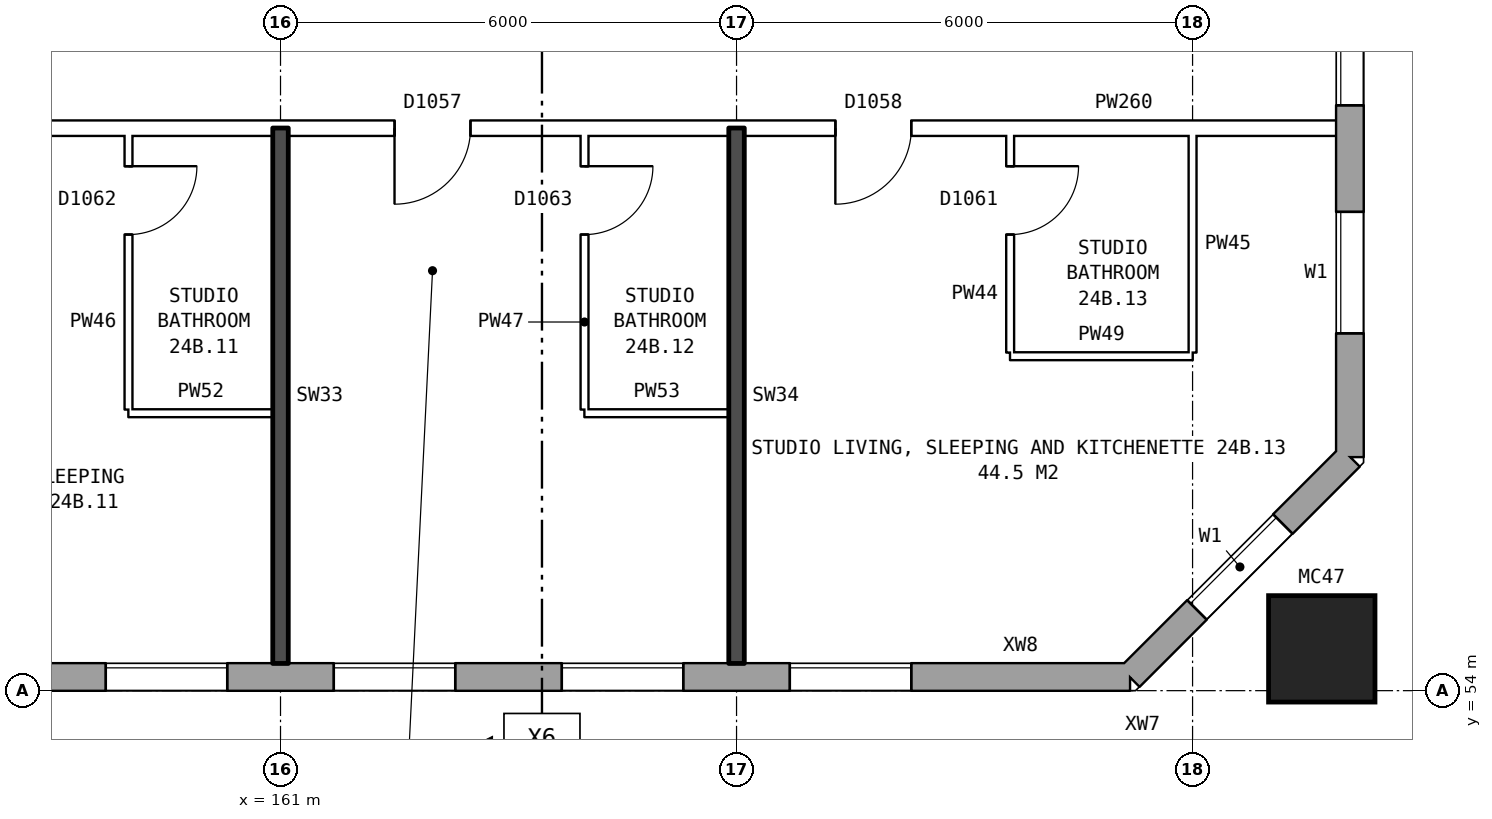
"""IFC4 building model, lengths in metres.
Left out: names, types, materials, properties, quantities, classifications, styles, units other than length and angle.
Written with IfcOpenShell. Run it as: python <this file> out.ifc"""

import sys

from ifc_helpers import new_model, si_unit, direction, frame, frame_2d, origin, origin_2d, place, context, subcontext, project, spatial, rectangle, hollow_rectangle, extrude, element, fill, save


model = new_model("IFC4")
c1 = context("Model", 3, precision=1e-05, world=origin(), true_north=direction((0.0, 1.0)))
c2 = subcontext(c1, "Body", "Model", "MODEL_VIEW")
j1 = project(units=[si_unit("LENGTHUNIT", "METRE"), si_unit("PLANEANGLEUNIT", "RADIAN")], contexts=[c1])
p1 = place(None, origin())
s1 = spatial("IfcSite", under=j1, at=p1, CompositionType="ELEMENT")
p2 = place(p1, origin())
s2 = spatial("IfcBuilding", under=s1, at=p2, CompositionType="ELEMENT")
p3 = place(p2, frame((0.0, 0.0, 87.1)))
s3 = spatial("IfcBuildingStorey", under=s2, at=p3, CompositionType="ELEMENT", Elevation=87.1)
p4 = place(p3, frame((174.7, 54.55, 0.0), z_axis=(0.0, 0.0, 1.0), x_axis=(1.0, 0.0, 0.0)))
e1 = element("IfcColumn", 1, at=p4, inside=s3, PredefinedType="COLUMN", context=c2, shape_type="SweptSolid", body=[
    extrude(hollow_rectangle(XDim=1.4, YDim=1.4, WallThickness=0.075, at=origin_2d()), origin(), (0.0, 0.0, 1.0), 3.1),
])
p5 = place(p3, frame((134.075, 54.18, 0.0), z_axis=(0.0, 0.0, 1.0), x_axis=(1.0, 0.0, 0.0)))
e2 = element("IfcWall", 2, at=p5, inside=s3, PredefinedType="STANDARD", context=c2, shape_type="SweptSolid", body=[
    extrude(rectangle(XDim=38.101, YDim=0.36, at=frame_2d((19.05, 0.0))), origin(), (0.0, 0.0, 1.0), 2.85),
])
p6 = place(p5, frame((0.625, 0.0, 0.8)))
e3 = element("IfcOpeningElement", 3, at=p6, cuts=e2, PredefinedType="OPENING", context=c2, shape_type="SweptSolid", body=[
    extrude(rectangle(XDim=1.6, YDim=1.8, at=frame_2d((0.8, 0.9))), frame((0.0, 0.19, 0.0), z_axis=(0.0, -1.0, 0.0), x_axis=(1.0, 0.0, 0.0)), (0.0, 0.0, 1.0), 0.38),
])
p7 = place(p5, frame((3.625, 0.0, 0.8)))
e4 = element("IfcOpeningElement", 4, at=p7, cuts=e2, PredefinedType="OPENING", context=c2, shape_type="SweptSolid", body=[
    extrude(rectangle(XDim=1.6, YDim=1.8, at=frame_2d((0.8, 0.9))), frame((0.0, 0.19, 0.0), z_axis=(0.0, -1.0, 0.0), x_axis=(1.0, 0.0, 0.0)), (0.0, 0.0, 1.0), 0.38),
])
p8 = place(p5, frame((6.625, 0.0, 0.8)))
e5 = element("IfcOpeningElement", 5, at=p8, cuts=e2, PredefinedType="OPENING", context=c2, shape_type="SweptSolid", body=[
    extrude(rectangle(XDim=1.6, YDim=1.8, at=frame_2d((0.8, 0.9))), frame((0.0, 0.19, 0.0), z_axis=(0.0, -1.0, 0.0), x_axis=(1.0, 0.0, 0.0)), (0.0, 0.0, 1.0), 0.38),
])
p9 = place(p5, frame((9.625, 0.0, 0.8)))
e6 = element("IfcOpeningElement", 6, at=p9, cuts=e2, PredefinedType="OPENING", context=c2, shape_type="SweptSolid", body=[
    extrude(rectangle(XDim=1.6, YDim=1.8, at=frame_2d((0.8, 0.9))), frame((0.0, 0.19, 0.0), z_axis=(0.0, -1.0, 0.0), x_axis=(1.0, 0.0, 0.0)), (0.0, 0.0, 1.0), 0.38),
])
p10 = place(p5, frame((12.625, 0.0, 0.8)))
e7 = element("IfcOpeningElement", 7, at=p10, cuts=e2, PredefinedType="OPENING", context=c2, shape_type="SweptSolid", body=[
    extrude(rectangle(XDim=1.6, YDim=1.8, at=frame_2d((0.8, 0.9))), frame((0.0, 0.19, 0.0), z_axis=(0.0, -1.0, 0.0), x_axis=(1.0, 0.0, 0.0)), (0.0, 0.0, 1.0), 0.38),
])
p11 = place(p5, frame((15.125, 0.0, 0.8)))
e8 = element("IfcOpeningElement", 8, at=p11, cuts=e2, PredefinedType="OPENING", context=c2, shape_type="SweptSolid", body=[
    extrude(rectangle(XDim=1.4, YDim=1.8, at=frame_2d((0.7, 0.9))), frame((0.0, 0.19, 0.0), z_axis=(0.0, -1.0, 0.0), x_axis=(1.0, 0.0, 0.0)), (0.0, 0.0, 1.0), 0.38),
])
p12 = place(p5, frame((18.325, 0.0, 0.15)))
e9 = element("IfcOpeningElement", 9, at=p12, cuts=e2, PredefinedType="OPENING", context=c2, shape_type="SweptSolid", body=[
    extrude(rectangle(XDim=1.4, YDim=1.2, at=frame_2d((0.7, 0.6))), frame((0.0, 0.19, 0.0), z_axis=(0.0, -1.0, 0.0), x_axis=(1.0, 0.0, 0.0)), (0.0, 0.0, 1.0), 0.38),
])
p13 = place(p5, frame((21.625, 0.0, 0.8)))
e10 = element("IfcOpeningElement", 10, at=p13, cuts=e2, PredefinedType="OPENING", context=c2, shape_type="SweptSolid", body=[
    extrude(rectangle(XDim=1.6, YDim=1.8, at=frame_2d((0.8, 0.9))), frame((0.0, 0.19, 0.0), z_axis=(0.0, -1.0, 0.0), x_axis=(1.0, 0.0, 0.0)), (0.0, 0.0, 1.0), 0.38),
])
p14 = place(p5, frame((24.625, 0.0, 0.8)))
e11 = element("IfcOpeningElement", 11, at=p14, cuts=e2, PredefinedType="OPENING", context=c2, shape_type="SweptSolid", body=[
    extrude(rectangle(XDim=1.6, YDim=1.8, at=frame_2d((0.8, 0.9))), frame((0.0, 0.19, 0.0), z_axis=(0.0, -1.0, 0.0), x_axis=(1.0, 0.0, 0.0)), (0.0, 0.0, 1.0), 0.38),
])
p15 = place(p5, frame((27.625, 0.0, 0.8)))
e12 = element("IfcOpeningElement", 12, at=p15, cuts=e2, PredefinedType="OPENING", context=c2, shape_type="SweptSolid", body=[
    extrude(rectangle(XDim=1.6, YDim=1.8, at=frame_2d((0.8, 0.9))), frame((0.0, 0.19, 0.0), z_axis=(0.0, -1.0, 0.0), x_axis=(1.0, 0.0, 0.0)), (0.0, 0.0, 1.0), 0.38),
])
p16 = place(p5, frame((30.625, 0.0, 0.8)))
e13 = element("IfcOpeningElement", 13, at=p16, cuts=e2, PredefinedType="OPENING", context=c2, shape_type="SweptSolid", body=[
    extrude(rectangle(XDim=1.6, YDim=1.8, at=frame_2d((0.8, 0.9))), frame((0.0, 0.19, 0.0), z_axis=(0.0, -1.0, 0.0), x_axis=(1.0, 0.0, 0.0)), (0.0, 0.0, 1.0), 0.38),
])
p17 = place(p5, frame((33.625, 0.0, 0.8)))
e14 = element("IfcOpeningElement", 14, at=p17, cuts=e2, PredefinedType="OPENING", context=c2, shape_type="SweptSolid", body=[
    extrude(rectangle(XDim=1.6, YDim=1.8, at=frame_2d((0.8, 0.9))), frame((0.0, 0.19, 0.0), z_axis=(0.0, -1.0, 0.0), x_axis=(1.0, 0.0, 0.0)), (0.0, 0.0, 1.0), 0.38),
])
p18 = place(p5, frame((16.825, 0.0, 1.7)))
e15 = element("IfcOpeningElement", 15, at=p18, cuts=e2, PredefinedType="OPENING", context=c2, shape_type="SweptSolid", body=[
    extrude(rectangle(XDim=0.6, YDim=0.9, at=frame_2d((0.3, 0.45))), frame((0.0, 0.19, 0.0), z_axis=(0.0, -1.0, 0.0), x_axis=(1.0, 0.0, 0.0)), (0.0, 0.0, 1.0), 0.38),
])
p19 = place(p3, frame((172.175, 54.18, 0.0), z_axis=(0.0, 0.0, 1.0), x_axis=(0.707106781187, 0.707106781187, 0.0)))
e16 = element("IfcWall", 16, at=p19, inside=s3, PredefinedType="STANDARD", context=c2, shape_type="SweptSolid", body=[
    extrude(rectangle(XDim=4.094, YDim=0.36, at=frame_2d((2.047, 0.0))), origin(), (0.0, 0.0, 1.0), 2.85),
])
p20 = place(p19, frame((1.247, 0.0, 0.8)))
e17 = element("IfcOpeningElement", 17, at=p20, cuts=e16, PredefinedType="OPENING", context=c2, shape_type="SweptSolid", body=[
    extrude(rectangle(XDim=1.6, YDim=1.8, at=frame_2d((0.8, 0.9))), frame((0.0, 0.19, 0.0), z_axis=(0.0, -1.0, 0.0), x_axis=(1.0, 0.0, 0.0)), (0.0, 0.0, 1.0), 0.38),
])
p21 = place(p3, frame((175.07, 57.075, 0.0), z_axis=(0.0, 0.0, 1.0), x_axis=(0.0, 1.0, 0.0)))
e18 = element("IfcWall", 18, at=p21, inside=s3, PredefinedType="STANDARD", context=c2, shape_type="SweptSolid", body=[
    extrude(rectangle(XDim=25.851, YDim=0.36, at=frame_2d((12.925, 0.0))), origin(), (0.0, 0.0, 1.0), 2.85),
])
p22 = place(p21, frame((1.625, 0.0, 0.8)))
e19 = element("IfcOpeningElement", 19, at=p22, cuts=e18, PredefinedType="OPENING", context=c2, shape_type="SweptSolid", body=[
    extrude(rectangle(XDim=1.6, YDim=1.8, at=frame_2d((0.8, 0.9))), frame((0.0, 0.19, 0.0), z_axis=(0.0, -1.0, 0.0), x_axis=(1.0, 0.0, 0.0)), (0.0, 0.0, 1.0), 0.38),
])
p23 = place(p21, frame((4.625, 0.0, 0.8)))
e20 = element("IfcOpeningElement", 20, at=p23, cuts=e18, PredefinedType="OPENING", context=c2, shape_type="SweptSolid", body=[
    extrude(rectangle(XDim=1.6, YDim=1.8, at=frame_2d((0.8, 0.9))), frame((0.0, 0.19, 0.0), z_axis=(0.0, -1.0, 0.0), x_axis=(1.0, 0.0, 0.0)), (0.0, 0.0, 1.0), 0.38),
])
p24 = place(p21, frame((7.625, 0.0, 0.8)))
e21 = element("IfcOpeningElement", 21, at=p24, cuts=e18, PredefinedType="OPENING", context=c2, shape_type="SweptSolid", body=[
    extrude(rectangle(XDim=1.6, YDim=1.8, at=frame_2d((0.8, 0.9))), frame((0.0, 0.19, 0.0), z_axis=(0.0, -1.0, 0.0), x_axis=(1.0, 0.0, 0.0)), (0.0, 0.0, 1.0), 0.38),
])
p25 = place(p21, frame((10.625, 0.0, 0.8)))
e22 = element("IfcOpeningElement", 22, at=p25, cuts=e18, PredefinedType="OPENING", context=c2, shape_type="SweptSolid", body=[
    extrude(rectangle(XDim=1.6, YDim=1.8, at=frame_2d((0.8, 0.9))), frame((0.0, 0.19, 0.0), z_axis=(0.0, -1.0, 0.0), x_axis=(1.0, 0.0, 0.0)), (0.0, 0.0, 1.0), 0.38),
])
p26 = place(p21, frame((13.625, 0.0, 0.8)))
e23 = element("IfcOpeningElement", 23, at=p26, cuts=e18, PredefinedType="OPENING", context=c2, shape_type="SweptSolid", body=[
    extrude(rectangle(XDim=1.6, YDim=1.8, at=frame_2d((0.8, 0.9))), frame((0.0, 0.19, 0.0), z_axis=(0.0, -1.0, 0.0), x_axis=(1.0, 0.0, 0.0)), (0.0, 0.0, 1.0), 0.38),
])
p27 = place(p21, frame((16.625, 0.0, 0.8)))
e24 = element("IfcOpeningElement", 24, at=p27, cuts=e18, PredefinedType="OPENING", context=c2, shape_type="SweptSolid", body=[
    extrude(rectangle(XDim=1.6, YDim=1.8, at=frame_2d((0.8, 0.9))), frame((0.0, 0.19, 0.0), z_axis=(0.0, -1.0, 0.0), x_axis=(1.0, 0.0, 0.0)), (0.0, 0.0, 1.0), 0.38),
])
p28 = place(p21, frame((19.625, 0.0, 0.8)))
e25 = element("IfcOpeningElement", 25, at=p28, cuts=e18, PredefinedType="OPENING", context=c2, shape_type="SweptSolid", body=[
    extrude(rectangle(XDim=1.6, YDim=1.8, at=frame_2d((0.8, 0.9))), frame((0.0, 0.19, 0.0), z_axis=(0.0, -1.0, 0.0), x_axis=(1.0, 0.0, 0.0)), (0.0, 0.0, 1.0), 0.38),
])
p29 = place(p21, frame((22.625, 0.0, 0.8)))
e26 = element("IfcOpeningElement", 26, at=p29, cuts=e18, PredefinedType="OPENING", context=c2, shape_type="SweptSolid", body=[
    extrude(rectangle(XDim=1.6, YDim=1.8, at=frame_2d((0.8, 0.9))), frame((0.0, 0.19, 0.0), z_axis=(0.0, -1.0, 0.0), x_axis=(1.0, 0.0, 0.0)), (0.0, 0.0, 1.0), 0.38),
])
for number, where, z_axis, x_axis in (
    (27, (159.0, 57.65, 0.0), (0.0, 0.0, 1.0), (1.0, 0.0, 0.0)),
    (28, (165.0, 57.65, 0.0), (0.0, 0.0, 1.0), (1.0, 0.0, 0.0)),
):
    element("IfcWall", number, at=place(p3, frame(where, z_axis=z_axis, x_axis=x_axis)), inside=s3, PredefinedType="PARTITIONING", context=c2, shape_type="SweptSolid", body=[
        extrude(rectangle(XDim=1.9, YDim=0.1, at=frame_2d((0.95, 0.0))), origin(), (0.0, 0.0, 1.0), 2.85),
    ])
p30 = place(p3, frame((170.6, 58.4, 0.0), z_axis=(0.0, 0.0, 1.0), x_axis=(1.0, 0.0, 0.0)))
e29 = element("IfcWall", 29, at=p30, inside=s3, PredefinedType="PARTITIONING", context=c2, shape_type="SweptSolid", body=[
    extrude(rectangle(XDim=2.4, YDim=0.1, at=frame_2d((1.2, 0.0))), origin(), (0.0, 0.0, 1.0), 2.85),
])
p31 = place(p3, frame((155.1, 61.4, 0.0), z_axis=(0.0, 0.0, 1.0), x_axis=(1.0, 0.0, 0.0)))
e30 = element("IfcWall", 30, at=p31, inside=s3, PredefinedType="PARTITIONING", context=c2, shape_type="SweptSolid", body=[
    extrude(rectangle(XDim=19.79, YDim=0.2, at=frame_2d((9.895, 0.0))), origin(), (0.0, 0.0, 1.0), 2.85),
])
p32 = place(p31, frame((1.45, 0.0, 0.0)))
e31 = element("IfcOpeningElement", 31, at=p32, cuts=e30, PredefinedType="OPENING", context=c2, shape_type="SweptSolid", body=[
    extrude(rectangle(XDim=1.0, YDim=2.1, at=frame_2d((0.5, 1.05))), frame((0.0, 0.11, 0.0), z_axis=(0.0, -1.0, 0.0), x_axis=(1.0, 0.0, 0.0)), (0.0, 0.0, 1.0), 0.22),
])
p33 = place(p31, frame((7.4, 0.0, 0.0)))
e32 = element("IfcOpeningElement", 32, at=p33, cuts=e30, PredefinedType="OPENING", context=c2, shape_type="SweptSolid", body=[
    extrude(rectangle(XDim=1.0, YDim=2.1, at=frame_2d((0.5, 1.05))), frame((0.0, 0.11, 0.0), z_axis=(0.0, -1.0, 0.0), x_axis=(1.0, 0.0, 0.0)), (0.0, 0.0, 1.0), 0.22),
])
p34 = place(p31, frame((13.2, 0.0, 0.0)))
e33 = element("IfcOpeningElement", 33, at=p34, cuts=e30, PredefinedType="OPENING", context=c2, shape_type="SweptSolid", body=[
    extrude(rectangle(XDim=1.0, YDim=2.1, at=frame_2d((0.5, 1.05))), frame((0.0, 0.11, 0.0), z_axis=(0.0, -1.0, 0.0), x_axis=(1.0, 0.0, 0.0)), (0.0, 0.0, 1.0), 0.22),
])
p35 = place(p3, frame((159.0, 57.7, 0.0), z_axis=(0.0, 0.0, 1.0), x_axis=(0.0, 1.0, 0.0)))
e34 = element("IfcWall", 34, at=p35, inside=s3, PredefinedType="PARTITIONING", context=c2, shape_type="SweptSolid", body=[
    extrude(rectangle(XDim=3.6, YDim=0.1, at=frame_2d((1.8, 0.0))), origin(), (0.0, 0.0, 1.0), 2.85),
])
p36 = place(p35, frame((2.3, 0.0, 0.0)))
e35 = element("IfcOpeningElement", 35, at=p36, cuts=e34, PredefinedType="OPENING", context=c2, shape_type="SweptSolid", body=[
    extrude(rectangle(XDim=0.9, YDim=2.1, at=frame_2d((0.45, 1.05))), frame((0.0, 0.06, 0.0), z_axis=(0.0, -1.0, 0.0), x_axis=(1.0, 0.0, 0.0)), (0.0, 0.0, 1.0), 0.12),
])
p37 = place(p3, frame((161.0, 54.36, 0.0), z_axis=(0.0, 0.0, 1.0), x_axis=(0.0, 1.0, 0.0)))
e36 = element("IfcWall", 36, at=p37, inside=s3, PredefinedType="SOLIDWALL", context=c2, shape_type="SweptSolid", body=[
    extrude(rectangle(XDim=7.04, YDim=0.2, at=frame_2d((3.52, 0.0))), origin(), (0.0, 0.0, 1.0), 2.85),
])
p38 = place(p3, frame((165.0, 57.7, 0.0), z_axis=(0.0, 0.0, 1.0), x_axis=(0.0, 1.0, 0.0)))
e37 = element("IfcWall", 37, at=p38, inside=s3, PredefinedType="PARTITIONING", context=c2, shape_type="SweptSolid", body=[
    extrude(rectangle(XDim=3.6, YDim=0.1, at=frame_2d((1.8, 0.0))), origin(), (0.0, 0.0, 1.0), 2.85),
])
p39 = place(p38, frame((2.3, 0.0, 0.0)))
e38 = element("IfcOpeningElement", 38, at=p39, cuts=e37, PredefinedType="OPENING", context=c2, shape_type="SweptSolid", body=[
    extrude(rectangle(XDim=0.9, YDim=2.1, at=frame_2d((0.45, 1.05))), frame((0.0, 0.06, 0.0), z_axis=(0.0, -1.0, 0.0), x_axis=(1.0, 0.0, 0.0)), (0.0, 0.0, 1.0), 0.12),
])
p40 = place(p3, frame((167.0, 54.36, 0.0), z_axis=(0.0, 0.0, 1.0), x_axis=(0.0, 1.0, 0.0)))
e39 = element("IfcWall", 39, at=p40, inside=s3, PredefinedType="SOLIDWALL", context=c2, shape_type="SweptSolid", body=[
    extrude(rectangle(XDim=7.04, YDim=0.2, at=frame_2d((3.52, 0.0))), origin(), (0.0, 0.0, 1.0), 2.85),
])
p41 = place(p3, frame((170.6, 58.45, 0.0), z_axis=(0.0, 0.0, 1.0), x_axis=(0.0, 1.0, 0.0)))
e40 = element("IfcWall", 40, at=p41, inside=s3, PredefinedType="PARTITIONING", context=c2, shape_type="SweptSolid", body=[
    extrude(rectangle(XDim=2.85, YDim=0.1, at=frame_2d((1.425, 0.0))), origin(), (0.0, 0.0, 1.0), 2.85),
])
p42 = place(p41, frame((1.55, 0.0, 0.0)))
e41 = element("IfcOpeningElement", 41, at=p42, cuts=e40, PredefinedType="OPENING", context=c2, shape_type="SweptSolid", body=[
    extrude(rectangle(XDim=0.9, YDim=2.1, at=frame_2d((0.45, 1.05))), frame((0.0, 0.06, 0.0), z_axis=(0.0, -1.0, 0.0), x_axis=(1.0, 0.0, 0.0)), (0.0, 0.0, 1.0), 0.12),
])
p43 = place(p3, frame((173.0, 58.45, 0.0), z_axis=(0.0, 0.0, 1.0), x_axis=(0.0, 1.0, 0.0)))
e42 = element("IfcWall", 42, at=p43, inside=s3, PredefinedType="PARTITIONING", context=c2, shape_type="SweptSolid", body=[
    extrude(rectangle(XDim=2.85, YDim=0.1, at=frame_2d((1.425, 0.0))), origin(), (0.0, 0.0, 1.0), 2.85),
])
p44 = place(p14, origin())
e43 = element("IfcWindow", 43, at=p44, inside=s3, PartitioningType="SINGLE_PANEL", PredefinedType="WINDOW", context=c2, shape_type="SweptSolid", body=[
    extrude(rectangle(XDim=1.6, YDim=1.8, at=frame_2d((0.8, 0.9))), frame((0.0, 0.15, 0.0), z_axis=(0.0, -1.0, 0.0), x_axis=(1.0, 0.0, 0.0)), (0.0, 0.0, 1.0), 0.06),
])
fill(e11, e43)
p45 = place(p15, origin())
e44 = element("IfcWindow", 44, at=p45, inside=s3, PartitioningType="SINGLE_PANEL", PredefinedType="WINDOW", context=c2, shape_type="SweptSolid", body=[
    extrude(rectangle(XDim=1.6, YDim=1.8, at=frame_2d((0.8, 0.9))), frame((0.0, 0.15, 0.0), z_axis=(0.0, -1.0, 0.0), x_axis=(1.0, 0.0, 0.0)), (0.0, 0.0, 1.0), 0.06),
])
fill(e12, e44)
p46 = place(p16, origin())
e45 = element("IfcWindow", 45, at=p46, inside=s3, PartitioningType="SINGLE_PANEL", PredefinedType="WINDOW", context=c2, shape_type="SweptSolid", body=[
    extrude(rectangle(XDim=1.6, YDim=1.8, at=frame_2d((0.8, 0.9))), frame((0.0, 0.15, 0.0), z_axis=(0.0, -1.0, 0.0), x_axis=(1.0, 0.0, 0.0)), (0.0, 0.0, 1.0), 0.06),
])
fill(e13, e45)
p47 = place(p17, origin())
e46 = element("IfcWindow", 46, at=p47, inside=s3, PartitioningType="SINGLE_PANEL", PredefinedType="WINDOW", context=c2, shape_type="SweptSolid", body=[
    extrude(rectangle(XDim=1.6, YDim=1.8, at=frame_2d((0.8, 0.9))), frame((0.0, 0.15, 0.0), z_axis=(0.0, -1.0, 0.0), x_axis=(1.0, 0.0, 0.0)), (0.0, 0.0, 1.0), 0.06),
])
fill(e14, e46)
p48 = place(p20, origin())
e47 = element("IfcWindow", 47, at=p48, inside=s3, PartitioningType="SINGLE_PANEL", PredefinedType="WINDOW", context=c2, shape_type="SweptSolid", body=[
    extrude(rectangle(XDim=1.6, YDim=1.8, at=frame_2d((0.8, 0.9))), frame((0.0, 0.15, 0.0), z_axis=(0.0, -1.0, 0.0), x_axis=(1.0, 0.0, 0.0)), (0.0, 0.0, 1.0), 0.06),
])
fill(e17, e47)
p49 = place(p22, origin())
e48 = element("IfcWindow", 48, at=p49, inside=s3, PartitioningType="SINGLE_PANEL", PredefinedType="WINDOW", context=c2, shape_type="SweptSolid", body=[
    extrude(rectangle(XDim=1.6, YDim=1.8, at=frame_2d((0.8, 0.9))), frame((0.0, 0.15, 0.0), z_axis=(0.0, -1.0, 0.0), x_axis=(1.0, 0.0, 0.0)), (0.0, 0.0, 1.0), 0.06),
])
fill(e19, e48)
p50 = place(p23, origin())
e49 = element("IfcWindow", 49, at=p50, inside=s3, PartitioningType="SINGLE_PANEL", PredefinedType="WINDOW", context=c2, shape_type="SweptSolid", body=[
    extrude(rectangle(XDim=1.6, YDim=1.8, at=frame_2d((0.8, 0.9))), frame((0.0, 0.15, 0.0), z_axis=(0.0, -1.0, 0.0), x_axis=(1.0, 0.0, 0.0)), (0.0, 0.0, 1.0), 0.06),
])
fill(e20, e49)
p51 = place(p36, frame((0.9, 0.0, 0.0), z_axis=(0.0, 0.0, 1.0), x_axis=(-1.0, 0.0, 0.0)))
e50 = element("IfcDoor", 50, at=p51, inside=s3, OperationType="SINGLE_SWING_LEFT", PredefinedType="DOOR", context=c2, shape_type="SweptSolid", body=[
    extrude(rectangle(XDim=0.9, YDim=2.1, at=frame_2d((0.45, 1.05))), frame((0.0, 0.025, 0.0), z_axis=(0.0, -1.0, 0.0), x_axis=(1.0, 0.0, 0.0)), (0.0, 0.0, 1.0), 0.05),
])
fill(e35, e50)
p52 = place(p33, frame((1.0, 0.0, 0.0), z_axis=(0.0, 0.0, 1.0), x_axis=(-1.0, 0.0, 0.0)))
e51 = element("IfcDoor", 51, at=p52, inside=s3, OperationType="SINGLE_SWING_RIGHT", PredefinedType="DOOR", context=c2, shape_type="SweptSolid", body=[
    extrude(rectangle(XDim=1.0, YDim=2.1, at=frame_2d((0.5, 1.05))), frame((0.0, 0.025, 0.0), z_axis=(0.0, -1.0, 0.0), x_axis=(1.0, 0.0, 0.0)), (0.0, 0.0, 1.0), 0.05),
])
fill(e32, e51)
p53 = place(p39, frame((0.9, 0.0, 0.0), z_axis=(0.0, 0.0, 1.0), x_axis=(-1.0, 0.0, 0.0)))
e52 = element("IfcDoor", 52, at=p53, inside=s3, OperationType="SINGLE_SWING_LEFT", PredefinedType="DOOR", context=c2, shape_type="SweptSolid", body=[
    extrude(rectangle(XDim=0.9, YDim=2.1, at=frame_2d((0.45, 1.05))), frame((0.0, 0.025, 0.0), z_axis=(0.0, -1.0, 0.0), x_axis=(1.0, 0.0, 0.0)), (0.0, 0.0, 1.0), 0.05),
])
fill(e38, e52)
p54 = place(p34, frame((1.0, 0.0, 0.0), z_axis=(0.0, 0.0, 1.0), x_axis=(-1.0, 0.0, 0.0)))
e53 = element("IfcDoor", 53, at=p54, inside=s3, OperationType="SINGLE_SWING_RIGHT", PredefinedType="DOOR", context=c2, shape_type="SweptSolid", body=[
    extrude(rectangle(XDim=1.0, YDim=2.1, at=frame_2d((0.5, 1.05))), frame((0.0, 0.025, 0.0), z_axis=(0.0, -1.0, 0.0), x_axis=(1.0, 0.0, 0.0)), (0.0, 0.0, 1.0), 0.05),
])
fill(e33, e53)
p55 = place(p42, frame((0.9, 0.0, 0.0), z_axis=(0.0, 0.0, 1.0), x_axis=(-1.0, 0.0, 0.0)))
e54 = element("IfcDoor", 54, at=p55, inside=s3, OperationType="SINGLE_SWING_LEFT", PredefinedType="DOOR", context=c2, shape_type="SweptSolid", body=[
    extrude(rectangle(XDim=0.9, YDim=2.1, at=frame_2d((0.45, 1.05))), frame((0.0, 0.025, 0.0), z_axis=(0.0, -1.0, 0.0), x_axis=(1.0, 0.0, 0.0)), (0.0, 0.0, 1.0), 0.05),
])
fill(e41, e54)
save(model, sys.argv[1])
